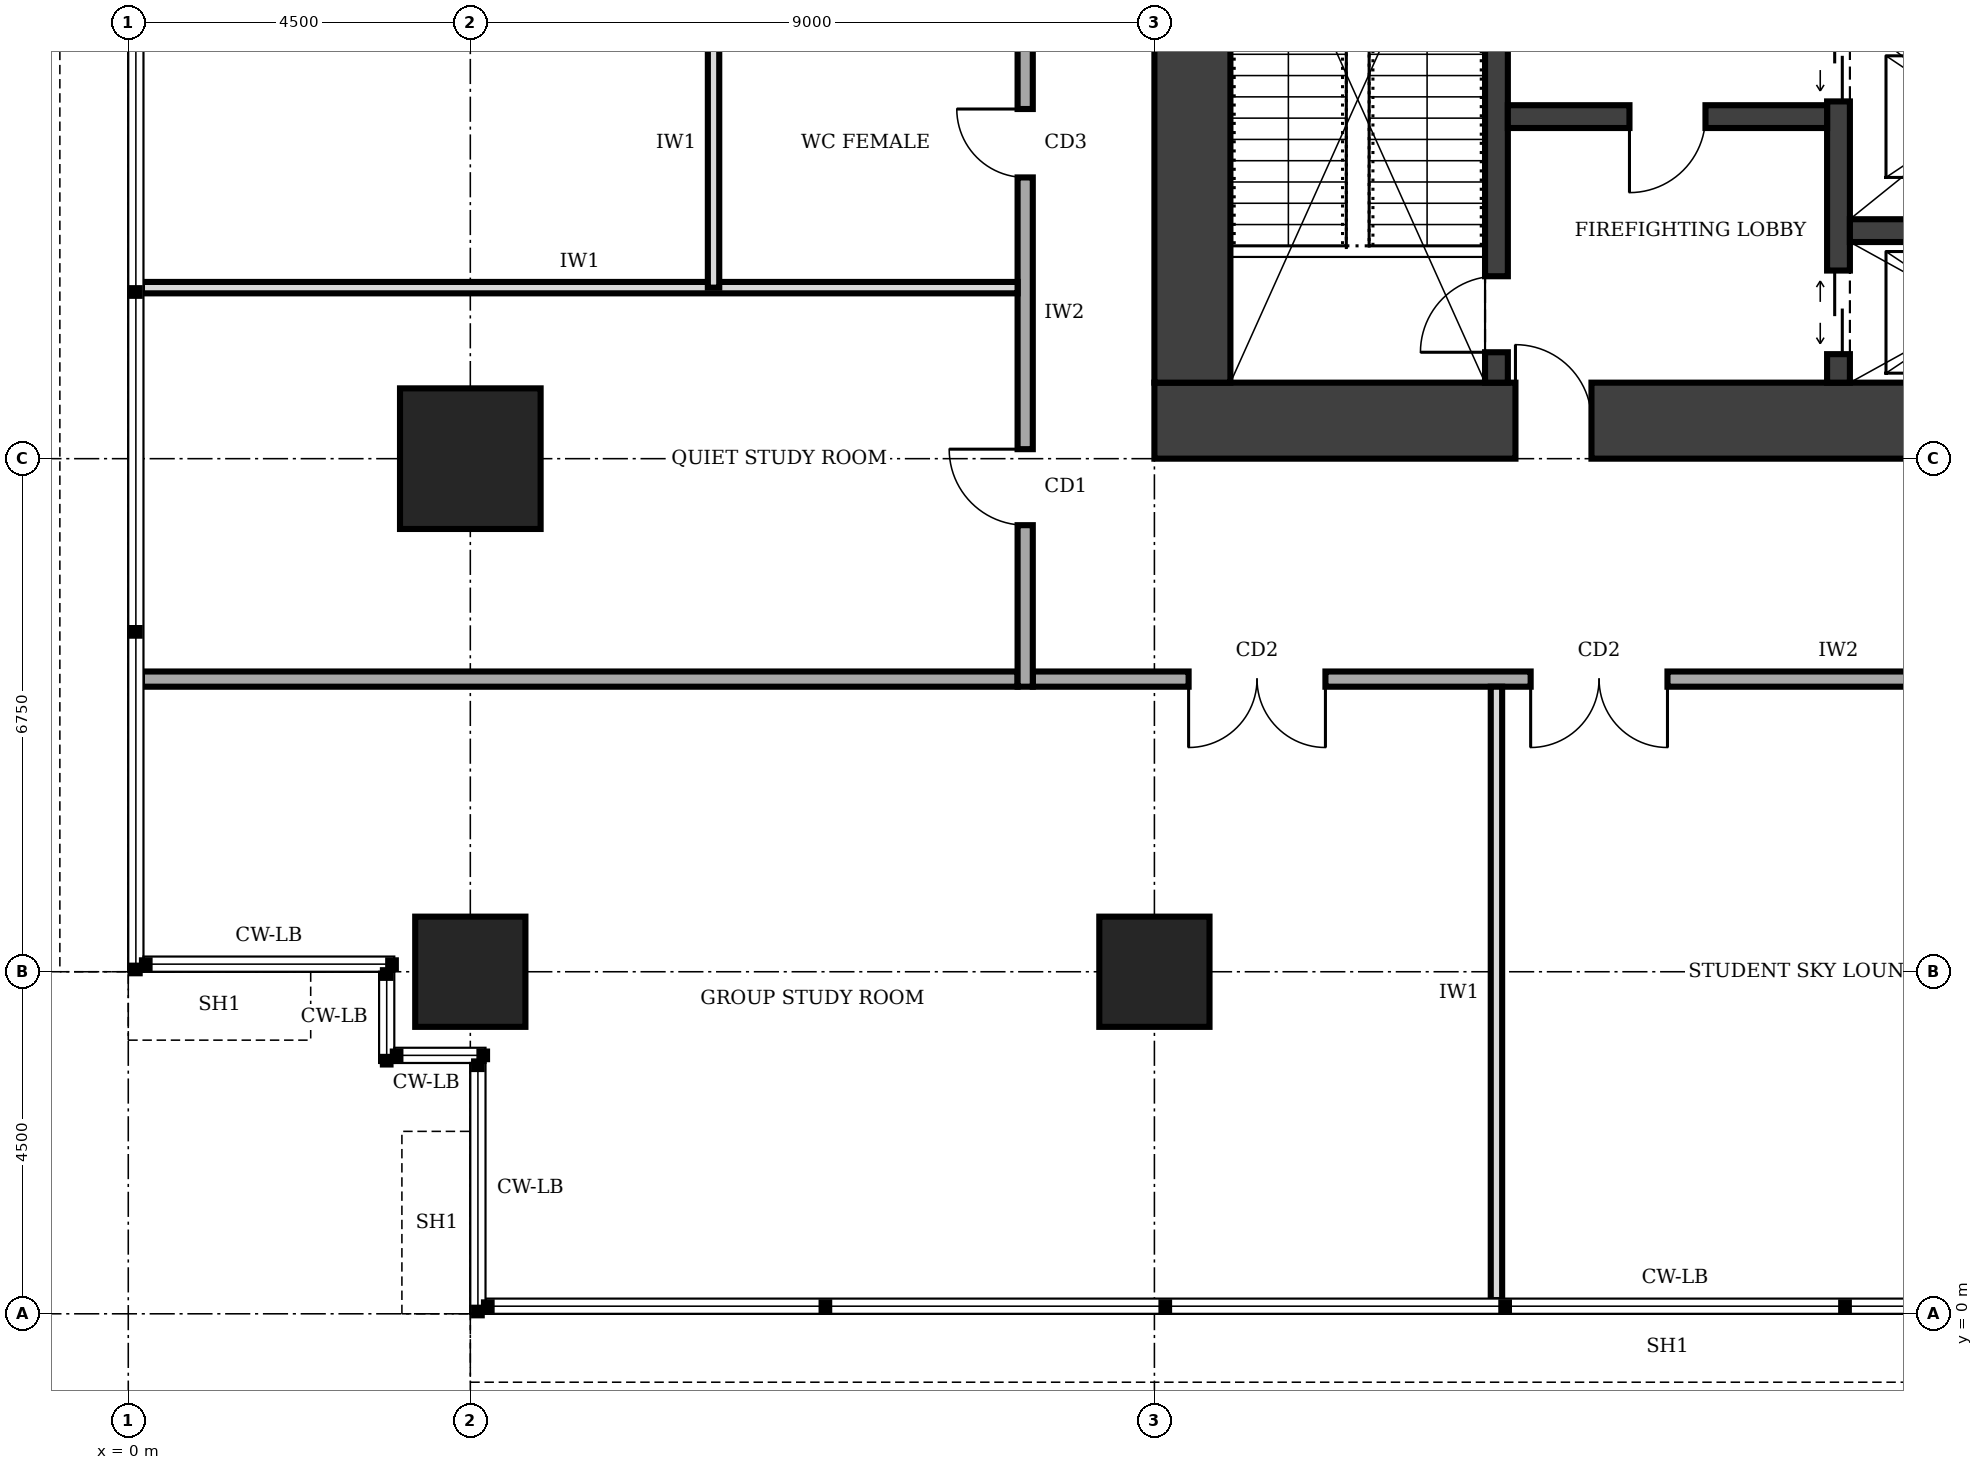
"""IFC4 building model, lengths in metres.
Left out: names, types, materials, properties, quantities, classifications, styles, units other than length and angle.
Written with IfcOpenShell. Run it as: python <this file> out.ifc"""

import sys

from ifc_helpers import new_model, si_unit, direction, frame, frame_2d, origin, origin_2d, place, context, subcontext, project, spatial, rectangle, extrude, element, fill, save


model = new_model("IFC4")
c1 = context("Model", 3, precision=1e-05, world=origin(), true_north=direction((0.0, 1.0)))
c2 = subcontext(c1, "Body", "Model", "MODEL_VIEW")
j1 = project(units=[si_unit("LENGTHUNIT", "METRE"), si_unit("PLANEANGLEUNIT", "RADIAN")], contexts=[c1])
p1 = place(None, origin())
s1 = spatial("IfcSite", under=j1, at=p1, CompositionType="ELEMENT")
p2 = place(p1, origin())
s2 = spatial("IfcBuilding", under=s1, at=p2, CompositionType="ELEMENT")
p3 = place(p2, frame((0.0, 0.0, 269.0)))
s3 = spatial("IfcBuildingStorey", under=s2, at=p3, CompositionType="ELEMENT", Elevation=269.0)
p4 = place(p3, frame((13.5, 11.75, 0.0), z_axis=(0.0, 0.0, 1.0), x_axis=(1.0, 0.0, 0.0)))
e1 = element("IfcWall", 1, at=p4, inside=s3, PredefinedType="SHEAR", context=c2, shape_type="SweptSolid", body=[
    extrude(rectangle(XDim=13.5, YDim=1.0, at=frame_2d((6.75, 0.0))), origin(), (0.0, 0.0, 1.0), 4.0),
])
p5 = place(p4, frame((4.75, 0.0, 0.0)))
e2 = element("IfcOpeningElement", 2, at=p5, cuts=e1, PredefinedType="OPENING", context=c2, shape_type="SweptSolid", body=[
    extrude(rectangle(XDim=1.0, YDim=2.1, at=frame_2d((0.5, 1.05))), frame((0.0, 0.51, 0.0), z_axis=(0.0, -1.0, 0.0), x_axis=(1.0, 0.0, 0.0)), (0.0, 0.0, 1.0), 1.02),
])
p6 = place(p3, frame((14.0, 28.25, 0.0), z_axis=(0.0, 0.0, 1.0), x_axis=(0.0, -1.0, 0.0)))
e3 = element("IfcWall", 3, at=p6, inside=s3, PredefinedType="SHEAR", context=c2, shape_type="SweptSolid", body=[
    extrude(rectangle(XDim=16.0, YDim=1.0, at=frame_2d((8.0, 0.0))), origin(), (0.0, 0.0, 1.0), 4.0),
])
p7 = place(p3, frame((18.0, 12.25, 0.0), z_axis=(0.0, 0.0, 1.0), x_axis=(0.0, 1.0, 0.0)))
e4 = element("IfcWall", 4, at=p7, inside=s3, PredefinedType="SHEAR", context=c2, shape_type="SweptSolid", body=[
    extrude(rectangle(XDim=16.0, YDim=0.3, at=frame_2d((8.0, 0.0))), origin(), (0.0, 0.0, 1.0), 4.0),
])
p8 = place(p7, frame((0.4, 0.0, 0.0)))
e5 = element("IfcOpeningElement", 5, at=p8, cuts=e4, PredefinedType="OPENING", context=c2, shape_type="SweptSolid", body=[
    extrude(rectangle(XDim=1.0, YDim=2.1, at=frame_2d((0.5, 1.05))), frame((0.0, 0.16, 0.0), z_axis=(0.0, -1.0, 0.0), x_axis=(1.0, 0.0, 0.0)), (0.0, 0.0, 1.0), 0.32),
])
p9 = place(p7, frame((14.525, 0.0, 0.0)))
e6 = element("IfcOpeningElement", 6, at=p9, cuts=e4, PredefinedType="OPENING", context=c2, shape_type="SweptSolid", body=[
    extrude(rectangle(XDim=1.1, YDim=2.1, at=frame_2d((0.55, 1.05))), frame((0.0, 0.16, 0.0), z_axis=(0.0, -1.0, 0.0), x_axis=(1.0, 0.0, 0.0)), (0.0, 0.0, 1.0), 0.32),
])
p10 = place(p7, frame((9.0, 0.0, 0.0)))
e7 = element("IfcOpeningElement", 7, at=p10, cuts=e4, PredefinedType="OPENING", context=c2, shape_type="SweptSolid", body=[
    extrude(rectangle(XDim=1.0, YDim=2.1, at=frame_2d((0.5, 1.05))), frame((0.0, 0.16, 0.0), z_axis=(0.0, -1.0, 0.0), x_axis=(1.0, 0.0, 0.0)), (0.0, 0.0, 1.0), 0.32),
])
p11 = place(p7, frame((12.0, 0.0, 0.0)))
e8 = element("IfcOpeningElement", 8, at=p11, cuts=e4, PredefinedType="OPENING", context=c2, shape_type="SweptSolid", body=[
    extrude(rectangle(XDim=1.0, YDim=2.1, at=frame_2d((0.5, 1.05))), frame((0.0, 0.16, 0.0), z_axis=(0.0, -1.0, 0.0), x_axis=(1.0, 0.0, 0.0)), (0.0, 0.0, 1.0), 0.32),
])
p12 = place(p3, frame((22.5, 12.25, 0.0), z_axis=(0.0, 0.0, 1.0), x_axis=(0.0, 1.0, 0.0)))
e9 = element("IfcWall", 9, at=p12, inside=s3, PredefinedType="SHEAR", context=c2, shape_type="SweptSolid", body=[
    extrude(rectangle(XDim=16.0, YDim=0.3, at=frame_2d((8.0, 0.0))), origin(), (0.0, 0.0, 1.0), 4.0),
])
p13 = place(p12, frame((14.6, 0.0, 0.0)))
e10 = element("IfcOpeningElement", 10, at=p13, cuts=e9, PredefinedType="OPENING", context=c2, shape_type="SweptSolid", body=[
    extrude(rectangle(XDim=1.0, YDim=2.1, at=frame_2d((0.5, 1.05))), frame((0.0, 0.16, 0.0), z_axis=(0.0, -1.0, 0.0), x_axis=(1.0, 0.0, 0.0)), (0.0, 0.0, 1.0), 0.32),
])
p14 = place(p12, frame((0.375, 0.0, 0.0)))
e11 = element("IfcOpeningElement", 11, at=p14, cuts=e9, PredefinedType="OPENING", context=c2, shape_type="SweptSolid", body=[
    extrude(rectangle(XDim=1.1, YDim=2.1, at=frame_2d((0.55, 1.05))), frame((0.0, 0.16, 0.0), z_axis=(0.0, -1.0, 0.0), x_axis=(1.0, 0.0, 0.0)), (0.0, 0.0, 1.0), 0.32),
])
p15 = place(p12, frame((3.7, 0.0, 0.0)))
e12 = element("IfcOpeningElement", 12, at=p15, cuts=e9, PredefinedType="OPENING", context=c2, shape_type="SweptSolid", body=[
    extrude(rectangle(XDim=1.1, YDim=2.1, at=frame_2d((0.55, 1.05))), frame((0.0, 0.16, 0.0), z_axis=(0.0, -1.0, 0.0), x_axis=(1.0, 0.0, 0.0)), (0.0, 0.0, 1.0), 0.32),
])
p16 = place(p12, frame((5.95, 0.0, 0.0)))
e13 = element("IfcOpeningElement", 13, at=p16, cuts=e9, PredefinedType="OPENING", context=c2, shape_type="SweptSolid", body=[
    extrude(rectangle(XDim=1.1, YDim=2.1, at=frame_2d((0.55, 1.05))), frame((0.0, 0.16, 0.0), z_axis=(0.0, -1.0, 0.0), x_axis=(1.0, 0.0, 0.0)), (0.0, 0.0, 1.0), 0.32),
])
p17 = place(p3, frame((18.15, 15.75, 0.0), z_axis=(0.0, 0.0, 1.0), x_axis=(1.0, 0.0, 0.0)))
e14 = element("IfcWall", 14, at=p17, inside=s3, PredefinedType="SHEAR", context=c2, shape_type="SweptSolid", body=[
    extrude(rectangle(XDim=4.2, YDim=0.3, at=frame_2d((2.1, 0.0))), origin(), (0.0, 0.0, 1.0), 4.0),
])
p18 = place(p17, frame((1.6, 0.0, 0.0)))
e15 = element("IfcOpeningElement", 15, at=p18, cuts=e14, PredefinedType="OPENING", context=c2, shape_type="SweptSolid", body=[
    extrude(rectangle(XDim=1.0, YDim=2.1, at=frame_2d((0.5, 1.05))), frame((0.0, 0.16, 0.0), z_axis=(0.0, -1.0, 0.0), x_axis=(1.0, 0.0, 0.0)), (0.0, 0.0, 1.0), 0.32),
])
p19 = place(p3, frame((22.65, 14.25, 0.0), z_axis=(0.0, 0.0, 1.0), x_axis=(1.0, 0.0, 0.0)))
e16 = element("IfcWall", 16, at=p19, inside=s3, PredefinedType="SHEAR", context=c2, shape_type="SweptSolid", body=[
    extrude(rectangle(XDim=3.35, YDim=0.3, at=frame_2d((1.675, 0.0))), origin(), (0.0, 0.0, 1.0), 4.0),
])
for number, where, z_axis, x_axis in (
    (17, (4.5, 4.5, 0.0), (0.0, 0.0, 1.0), (1.0, 0.0, 0.0)),
    (18, (13.5, 4.5, 0.0), (0.0, 0.0, 1.0), (1.0, 0.0, 0.0)),
):
    element("IfcColumn", number, at=place(p3, frame(where, z_axis=z_axis, x_axis=x_axis)), inside=s3, PredefinedType="COLUMN", context=c2, shape_type="SweptSolid", body=[
        extrude(rectangle(XDim=1.45, YDim=1.45, at=origin_2d()), origin(), (0.0, 0.0, 1.0), 4.0),
    ])
p20 = place(p3, frame((4.5, 11.25, 0.0), z_axis=(0.0, 0.0, 1.0), x_axis=(1.0, 0.0, 0.0)))
e19 = element("IfcColumn", 19, at=p20, inside=s3, PredefinedType="COLUMN", context=c2, shape_type="SweptSolid", body=[
    extrude(rectangle(XDim=1.85, YDim=1.85, at=origin_2d()), origin(), (0.0, 0.0, 1.0), 4.0),
])
p21 = place(p3, frame((11.9, 8.35, 0.0), z_axis=(0.0, 0.0, 1.0), x_axis=(1.0, 0.0, 0.0)))
e20 = element("IfcWall", 20, at=p21, inside=s3, PredefinedType="SOLIDWALL", context=c2, shape_type="SweptSolid", body=[
    extrude(rectangle(XDim=17.65, YDim=0.2, at=frame_2d((8.825, 0.0))), origin(), (0.0, 0.0, 1.0), 3.75),
])
p22 = place(p21, frame((2.05, 0.0, 0.0)))
e21 = element("IfcOpeningElement", 21, at=p22, cuts=e20, PredefinedType="OPENING", context=c2, shape_type="SweptSolid", body=[
    extrude(rectangle(XDim=1.8, YDim=2.1, at=frame_2d((0.9, 1.05))), frame((0.0, 0.11, 0.0), z_axis=(0.0, -1.0, 0.0), x_axis=(1.0, 0.0, 0.0)), (0.0, 0.0, 1.0), 0.22),
])
p23 = place(p21, frame((6.55, 0.0, 0.0)))
e22 = element("IfcOpeningElement", 22, at=p23, cuts=e20, PredefinedType="OPENING", context=c2, shape_type="SweptSolid", body=[
    extrude(rectangle(XDim=1.8, YDim=2.1, at=frame_2d((0.9, 1.05))), frame((0.0, 0.11, 0.0), z_axis=(0.0, -1.0, 0.0), x_axis=(1.0, 0.0, 0.0)), (0.0, 0.0, 1.0), 0.22),
])
p24 = place(p21, frame((12.85, 0.0, 0.0)))
e23 = element("IfcOpeningElement", 23, at=p24, cuts=e20, PredefinedType="OPENING", context=c2, shape_type="SweptSolid", body=[
    extrude(rectangle(XDim=1.8, YDim=2.1, at=frame_2d((0.9, 1.05))), frame((0.0, 0.11, 0.0), z_axis=(0.0, -1.0, 0.0), x_axis=(1.0, 0.0, 0.0)), (0.0, 0.0, 1.0), 0.22),
])
p25 = place(p21, frame((15.875, 0.0, 0.0)))
e24 = element("IfcOpeningElement", 24, at=p25, cuts=e20, PredefinedType="OPENING", context=c2, shape_type="SweptSolid", body=[
    extrude(rectangle(XDim=1.0, YDim=2.1, at=frame_2d((0.5, 1.05))), frame((0.0, 0.11, 0.0), z_axis=(0.0, -1.0, 0.0), x_axis=(1.0, 0.0, 0.0)), (0.0, 0.0, 1.0), 0.22),
])
p26 = place(p3, frame((11.8, 32.05, 0.0), z_axis=(0.0, 0.0, 1.0), x_axis=(0.0, -1.0, 0.0)))
e25 = element("IfcWall", 25, at=p26, inside=s3, PredefinedType="SOLIDWALL", context=c2, shape_type="SweptSolid", body=[
    extrude(rectangle(XDim=23.8, YDim=0.2, at=frame_2d((11.9, 0.0))), origin(), (0.0, 0.0, 1.0), 3.75),
])
p27 = place(p26, frame((20.675, 0.0, 0.0)))
e26 = element("IfcOpeningElement", 26, at=p27, cuts=e25, PredefinedType="OPENING", context=c2, shape_type="SweptSolid", body=[
    extrude(rectangle(XDim=1.0, YDim=2.1, at=frame_2d((0.5, 1.05))), frame((0.0, 0.11, 0.0), z_axis=(0.0, -1.0, 0.0), x_axis=(1.0, 0.0, 0.0)), (0.0, 0.0, 1.0), 0.22),
])
p28 = place(p26, frame((16.2, 0.0, 0.0)))
e27 = element("IfcOpeningElement", 27, at=p28, cuts=e25, PredefinedType="OPENING", context=c2, shape_type="SweptSolid", body=[
    extrude(rectangle(XDim=0.9, YDim=2.1, at=frame_2d((0.45, 1.05))), frame((0.0, 0.11, 0.0), z_axis=(0.0, -1.0, 0.0), x_axis=(1.0, 0.0, 0.0)), (0.0, 0.0, 1.0), 0.22),
])
p29 = place(p26, frame((13.2, 0.0, 0.0)))
e28 = element("IfcOpeningElement", 28, at=p29, cuts=e25, PredefinedType="OPENING", context=c2, shape_type="SweptSolid", body=[
    extrude(rectangle(XDim=0.9, YDim=2.1, at=frame_2d((0.45, 1.05))), frame((0.0, 0.11, 0.0), z_axis=(0.0, -1.0, 0.0), x_axis=(1.0, 0.0, 0.0)), (0.0, 0.0, 1.0), 0.22),
])
p30 = place(p26, frame((8.35, 0.0, 0.0)))
e29 = element("IfcOpeningElement", 29, at=p30, cuts=e25, PredefinedType="OPENING", context=c2, shape_type="SweptSolid", body=[
    extrude(rectangle(XDim=0.9, YDim=2.1, at=frame_2d((0.45, 1.05))), frame((0.0, 0.11, 0.0), z_axis=(0.0, -1.0, 0.0), x_axis=(1.0, 0.0, 0.0)), (0.0, 0.0, 1.0), 0.22),
])
p31 = place(p26, frame((5.55, 0.0, 0.0)))
e30 = element("IfcOpeningElement", 30, at=p31, cuts=e25, PredefinedType="OPENING", context=c2, shape_type="SweptSolid", body=[
    extrude(rectangle(XDim=1.0, YDim=2.1, at=frame_2d((0.5, 1.05))), frame((0.0, 0.11, 0.0), z_axis=(0.0, -1.0, 0.0), x_axis=(1.0, 0.0, 0.0)), (0.0, 0.0, 1.0), 0.22),
])
p32 = place(p26, frame((11.05, 0.0, 0.0)))
e31 = element("IfcOpeningElement", 31, at=p32, cuts=e25, PredefinedType="OPENING", context=c2, shape_type="SweptSolid", body=[
    extrude(rectangle(XDim=1.0, YDim=2.1, at=frame_2d((0.5, 1.05))), frame((0.0, 0.11, 0.0), z_axis=(0.0, -1.0, 0.0), x_axis=(1.0, 0.0, 0.0)), (0.0, 0.0, 1.0), 0.22),
])
p33 = place(p26, frame((1.925, 0.0, 0.0)))
e32 = element("IfcOpeningElement", 32, at=p33, cuts=e25, PredefinedType="OPENING", context=c2, shape_type="SweptSolid", body=[
    extrude(rectangle(XDim=1.0, YDim=2.1, at=frame_2d((0.5, 1.05))), frame((0.0, 0.11, 0.0), z_axis=(0.0, -1.0, 0.0), x_axis=(1.0, 0.0, 0.0)), (0.0, 0.0, 1.0), 0.22),
])
p34 = place(p3, frame((0.18, 8.35, 0.0), z_axis=(0.0, 0.0, 1.0), x_axis=(1.0, 0.0, 0.0)))
e33 = element("IfcWall", 33, at=p34, inside=s3, PredefinedType="SOLIDWALL", context=c2, shape_type="SweptSolid", body=[
    extrude(rectangle(XDim=11.52, YDim=0.2, at=frame_2d((5.76, 0.0))), origin(), (0.0, 0.0, 1.0), 3.75),
])
p35 = place(p3, frame((18.0, 0.18, 0.0), z_axis=(0.0, 0.0, 1.0), x_axis=(0.0, 1.0, 0.0)))
e34 = element("IfcWall", 34, at=p35, inside=s3, PredefinedType="PARTITIONING", context=c2, shape_type="SweptSolid", body=[
    extrude(rectangle(XDim=8.07, YDim=0.15, at=frame_2d((4.035, 0.0))), origin(), (0.0, 0.0, 1.0), 3.75),
])
p36 = place(p3, frame((0.18, 13.5, 0.0), z_axis=(0.0, 0.0, 1.0), x_axis=(1.0, 0.0, 0.0)))
e35 = element("IfcWall", 35, at=p36, inside=s3, PredefinedType="PARTITIONING", context=c2, shape_type="SweptSolid", body=[
    extrude(rectangle(XDim=11.52, YDim=0.15, at=frame_2d((5.76, 0.0))), origin(), (0.0, 0.0, 1.0), 3.75),
])
p37 = place(p3, frame((7.7, 13.5, 0.0), z_axis=(0.0, 0.0, 1.0), x_axis=(0.0, 1.0, 0.0)))
e36 = element("IfcWall", 36, at=p37, inside=s3, PredefinedType="PARTITIONING", context=c2, shape_type="SweptSolid", body=[
    extrude(rectangle(XDim=3.8, YDim=0.15, at=frame_2d((1.9, 0.0))), origin(), (0.0, 0.0, 1.0), 3.75),
])
p38 = place(p5, origin())
e37 = element("IfcDoor", 37, at=p38, inside=s3, OperationType="SINGLE_SWING_LEFT", PredefinedType="DOOR", context=c2, shape_type="SweptSolid", body=[
    extrude(rectangle(XDim=1.0, YDim=2.1, at=frame_2d((0.5, 1.05))), frame((0.0, 0.025, 0.0), z_axis=(0.0, -1.0, 0.0), x_axis=(1.0, 0.0, 0.0)), (0.0, 0.0, 1.0), 0.05),
])
fill(e2, e37)
p39 = place(p18, frame((1.0, 0.0, 0.0), z_axis=(0.0, 0.0, 1.0), x_axis=(-1.0, 0.0, 0.0)))
e38 = element("IfcDoor", 38, at=p39, inside=s3, OperationType="SINGLE_SWING_RIGHT", PredefinedType="DOOR", context=c2, shape_type="SweptSolid", body=[
    extrude(rectangle(XDim=1.0, YDim=2.1, at=frame_2d((0.5, 1.05))), frame((0.0, 0.025, 0.0), z_axis=(0.0, -1.0, 0.0), x_axis=(1.0, 0.0, 0.0)), (0.0, 0.0, 1.0), 0.05),
])
fill(e15, e38)
p40 = place(p8, origin())
e39 = element("IfcDoor", 39, at=p40, inside=s3, OperationType="SINGLE_SWING_LEFT", PredefinedType="DOOR", context=c2, shape_type="SweptSolid", body=[
    extrude(rectangle(XDim=1.0, YDim=2.1, at=frame_2d((0.5, 1.05))), frame((0.0, 0.025, 0.0), z_axis=(0.0, -1.0, 0.0), x_axis=(1.0, 0.0, 0.0)), (0.0, 0.0, 1.0), 0.05),
])
fill(e5, e39)
p41 = place(p14, origin())
e40 = element("IfcDoor", 40, at=p41, inside=s3, OperationType="DOUBLE_DOOR_SLIDING", PredefinedType="DOOR", context=c2, shape_type="SweptSolid", body=[
    extrude(rectangle(XDim=1.1, YDim=2.1, at=frame_2d((0.55, 1.05))), frame((0.0, 0.025, 0.0), z_axis=(0.0, -1.0, 0.0), x_axis=(1.0, 0.0, 0.0)), (0.0, 0.0, 1.0), 0.05),
])
fill(e11, e40)
p42 = place(p15, origin())
e41 = element("IfcDoor", 41, at=p42, inside=s3, OperationType="DOUBLE_DOOR_SLIDING", PredefinedType="DOOR", context=c2, shape_type="SweptSolid", body=[
    extrude(rectangle(XDim=1.1, YDim=2.1, at=frame_2d((0.55, 1.05))), frame((0.0, 0.025, 0.0), z_axis=(0.0, -1.0, 0.0), x_axis=(1.0, 0.0, 0.0)), (0.0, 0.0, 1.0), 0.05),
])
fill(e12, e41)
p43 = place(p22, frame((1.8, 0.0, 0.0), z_axis=(0.0, 0.0, 1.0), x_axis=(-1.0, 0.0, 0.0)))
e42 = element("IfcDoor", 42, at=p43, inside=s3, OperationType="DOUBLE_DOOR_SINGLE_SWING", PredefinedType="DOOR", context=c2, shape_type="SweptSolid", body=[
    extrude(rectangle(XDim=1.8, YDim=2.1, at=frame_2d((0.9, 1.05))), frame((0.0, 0.025, 0.0), z_axis=(0.0, -1.0, 0.0), x_axis=(1.0, 0.0, 0.0)), (0.0, 0.0, 1.0), 0.05),
])
fill(e21, e42)
p44 = place(p23, frame((1.8, 0.0, 0.0), z_axis=(0.0, 0.0, 1.0), x_axis=(-1.0, 0.0, 0.0)))
e43 = element("IfcDoor", 43, at=p44, inside=s3, OperationType="DOUBLE_DOOR_SINGLE_SWING", PredefinedType="DOOR", context=c2, shape_type="SweptSolid", body=[
    extrude(rectangle(XDim=1.8, YDim=2.1, at=frame_2d((0.9, 1.05))), frame((0.0, 0.025, 0.0), z_axis=(0.0, -1.0, 0.0), x_axis=(1.0, 0.0, 0.0)), (0.0, 0.0, 1.0), 0.05),
])
fill(e22, e43)
p45 = place(p27, frame((1.0, 0.0, 0.0), z_axis=(0.0, 0.0, 1.0), x_axis=(-1.0, 0.0, 0.0)))
e44 = element("IfcDoor", 44, at=p45, inside=s3, OperationType="SINGLE_SWING_RIGHT", PredefinedType="DOOR", context=c2, shape_type="SweptSolid", body=[
    extrude(rectangle(XDim=1.0, YDim=2.1, at=frame_2d((0.5, 1.05))), frame((0.0, 0.025, 0.0), z_axis=(0.0, -1.0, 0.0), x_axis=(1.0, 0.0, 0.0)), (0.0, 0.0, 1.0), 0.05),
])
fill(e26, e44)
p46 = place(p28, frame((0.9, 0.0, 0.0), z_axis=(0.0, 0.0, 1.0), x_axis=(-1.0, 0.0, 0.0)))
e45 = element("IfcDoor", 45, at=p46, inside=s3, OperationType="SINGLE_SWING_RIGHT", PredefinedType="DOOR", context=c2, shape_type="SweptSolid", body=[
    extrude(rectangle(XDim=0.9, YDim=2.1, at=frame_2d((0.45, 1.05))), frame((0.0, 0.025, 0.0), z_axis=(0.0, -1.0, 0.0), x_axis=(1.0, 0.0, 0.0)), (0.0, 0.0, 1.0), 0.05),
])
fill(e27, e45)
save(model, sys.argv[1])
